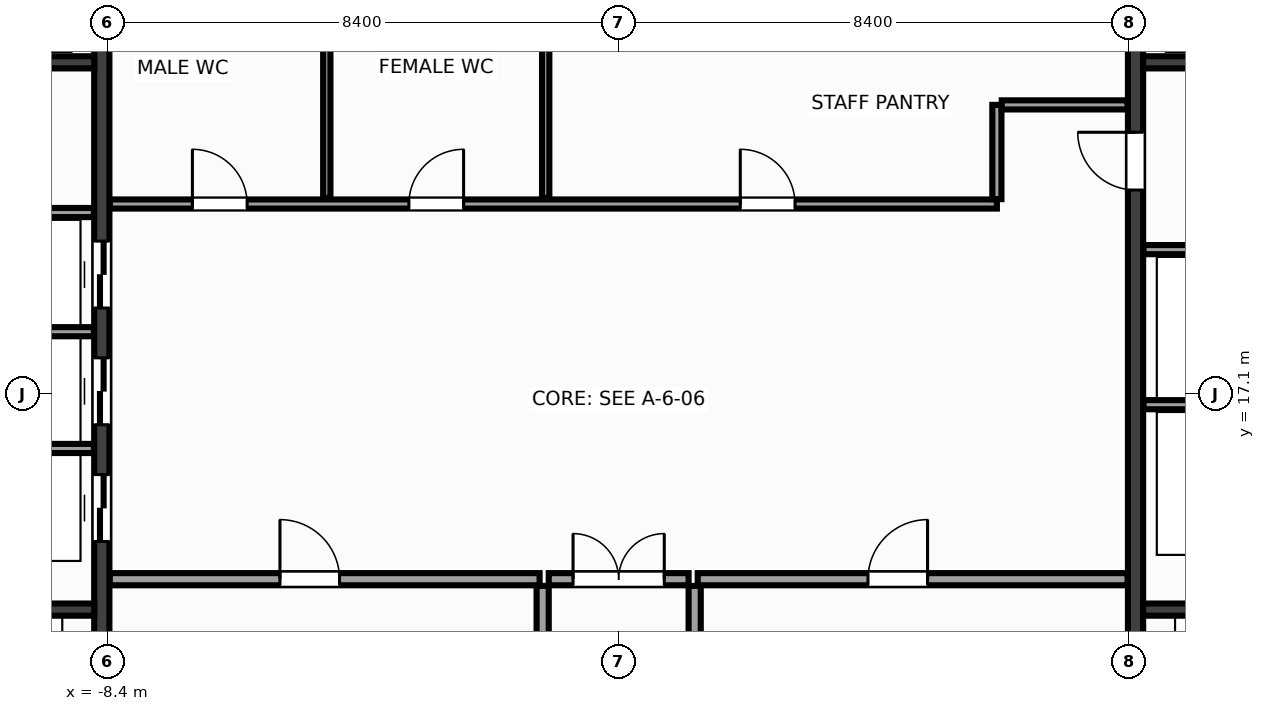
"""IFC4 building model, lengths in metres.
Left out: names, types, materials, properties, quantities, classifications, styles, units other than length and angle.
Written with IfcOpenShell. Run it as: python <this file> out.ifc"""

import sys

from ifc_helpers import new_model, si_unit, direction, frame, frame_2d, origin, place, context, subcontext, project, spatial, rectangle, extrude, source, transform, mapped, element, fill, save


model = new_model("IFC4")
c1 = context("Model", 3, precision=1e-05, world=origin(), true_north=direction((0.0, 1.0)))
c2 = subcontext(c1, "Body", "Model", "MODEL_VIEW")
j1 = project(units=[si_unit("LENGTHUNIT", "METRE"), si_unit("PLANEANGLEUNIT", "RADIAN")], contexts=[c1])
p1 = place(None, origin())
s1 = spatial("IfcSite", under=j1, at=p1, CompositionType="ELEMENT")
p2 = place(p1, origin())
s2 = spatial("IfcBuilding", under=s1, at=p2, CompositionType="ELEMENT")
p3 = place(p2, frame((0.0, 0.0, 196.4)))
s3 = spatial("IfcBuildingStorey", under=s2, at=p3, CompositionType="ELEMENT", Elevation=196.4)
m1 = source(origin(), c2, "Body", "SweptSolid", [
    extrude(rectangle(XDim=13.1, YDim=0.25, at=frame_2d((6.55, 0.0))), origin(), (0.0, 0.0, 1.0), 3.6),
])
p4 = place(p3, frame((-8.5, 10.45, 0.0), z_axis=(0.0, 0.0, 1.0), x_axis=(0.0, 1.0, 0.0)))
e1 = element("IfcWall", 1, at=p4, inside=s3, PredefinedType="SHEAR", context=c2, shape_type="MappedRepresentation", body=[
    mapped(m1, transform((0.0, 0.0, 0.0), x_axis=(1.0, 0.0, 0.0), y_axis=(0.0, 1.0, 0.0), z_axis=(0.0, 0.0, 1.0), scale=1.0)),
])
p5 = place(p4, frame((4.22, 0.0, 0.0)))
e2 = element("IfcOpeningElement", 2, at=p5, cuts=e1, PredefinedType="OPENING", context=c2, shape_type="SweptSolid", body=[
    extrude(rectangle(XDim=1.1, YDim=2.15, at=frame_2d((0.55, 1.075))), frame((0.0, 0.137, 0.0), z_axis=(0.0, -1.0, 0.0), x_axis=(1.0, 0.0, 0.0)), (0.0, 0.0, 1.0), 0.274),
])
p6 = place(p4, frame((6.14, 0.0, 0.0)))
e3 = element("IfcOpeningElement", 3, at=p6, cuts=e1, PredefinedType="OPENING", context=c2, shape_type="SweptSolid", body=[
    extrude(rectangle(XDim=1.1, YDim=2.15, at=frame_2d((0.55, 1.075))), frame((0.0, 0.137, 0.0), z_axis=(0.0, -1.0, 0.0), x_axis=(1.0, 0.0, 0.0)), (0.0, 0.0, 1.0), 0.274),
])
p7 = place(p4, frame((8.06, 0.0, 0.0)))
e4 = element("IfcOpeningElement", 4, at=p7, cuts=e1, PredefinedType="OPENING", context=c2, shape_type="SweptSolid", body=[
    extrude(rectangle(XDim=1.1, YDim=2.15, at=frame_2d((0.55, 1.075))), frame((0.0, 0.137, 0.0), z_axis=(0.0, -1.0, 0.0), x_axis=(1.0, 0.0, 0.0)), (0.0, 0.0, 1.0), 0.274),
])
p8 = place(p3, frame((8.5, 10.45, 0.0), z_axis=(0.0, 0.0, 1.0), x_axis=(0.0, 1.0, 0.0)))
e5 = element("IfcWall", 5, at=p8, inside=s3, PredefinedType="SHEAR", context=c2, shape_type="MappedRepresentation", body=[
    mapped(m1, transform((0.0, 0.0, 0.0), x_axis=(1.0, 0.0, 0.0), y_axis=(0.0, 1.0, 0.0), z_axis=(0.0, 0.0, 1.0), scale=1.0)),
])
p9 = place(p8, frame((10.0, 0.0, 0.0)))
e6 = element("IfcOpeningElement", 6, at=p9, cuts=e5, PredefinedType="OPENING", context=c2, shape_type="SweptSolid", body=[
    extrude(rectangle(XDim=0.95, YDim=2.15, at=frame_2d((0.475, 1.075))), frame((0.0, 0.137, 0.0), z_axis=(0.0, -1.0, 0.0), x_axis=(1.0, 0.0, 0.0)), (0.0, 0.0, 1.0), 0.274),
])
m2 = source(origin(), c2, "Body", "SweptSolid", [
    extrude(rectangle(XDim=2.825, YDim=0.2, at=frame_2d((1.413, 0.0))), origin(), (0.0, 0.0, 1.0), 3.6),
])
for number, where, z_axis, x_axis in (
    (7, (-11.45, 13.55, 0.0), (0.0, 0.0, 1.0), (1.0, 0.0, 0.0)),
    (8, (8.625, 13.55, 0.0), (0.0, 0.0, 1.0), (1.0, 0.0, 0.0)),
):
    element("IfcWall", number, at=place(p3, frame(where, z_axis=z_axis, x_axis=x_axis)), inside=s3, PredefinedType="SHEAR", context=c2, shape_type="MappedRepresentation", body=[
        mapped(m2, transform((0.0, 0.0, 0.0), x_axis=(1.0, 0.0, 0.0), y_axis=(0.0, 1.0, 0.0), z_axis=(0.0, 0.0, 1.0), scale=1.0)),
    ])
m3 = source(origin(), c2, "Body", "SweptSolid", [
    extrude(rectangle(XDim=3.02, YDim=0.2, at=frame_2d((1.51, 0.0))), origin(), (0.0, 0.0, 1.0), 3.6),
])
for number, where, z_axis, x_axis in (
    (9, (-11.645, 22.55, 0.0), (0.0, 0.0, 1.0), (1.0, 0.0, 0.0)),
    (10, (8.625, 22.55, 0.0), (0.0, 0.0, 1.0), (1.0, 0.0, 0.0)),
):
    element("IfcWall", number, at=place(p3, frame(where, z_axis=z_axis, x_axis=x_axis)), inside=s3, PredefinedType="SHEAR", context=c2, shape_type="MappedRepresentation", body=[
        mapped(m3, transform((0.0, 0.0, 0.0), x_axis=(1.0, 0.0, 0.0), y_axis=(0.0, 1.0, 0.0), z_axis=(0.0, 0.0, 1.0), scale=1.0)),
    ])
m4 = source(origin(), c2, "Body", "SweptSolid", [
    extrude(rectangle(XDim=3.01, YDim=0.15, at=frame_2d((1.505, 0.0))), origin(), (0.0, 0.0, 1.0), 3.38),
])
for number, where, z_axis, x_axis in (
    (11, (-11.64, 16.2, 0.0), (0.0, 0.0, 1.0), (1.0, 0.0, 0.0)),
    (12, (-11.64, 18.12, 0.0), (0.0, 0.0, 1.0), (1.0, 0.0, 0.0)),
    (13, (-11.64, 20.08, 0.0), (0.0, 0.0, 1.0), (1.0, 0.0, 0.0)),
    (14, (8.63, 16.92, 0.0), (0.0, 0.0, 1.0), (1.0, 0.0, 0.0)),
    (15, (8.63, 19.47, 0.0), (0.0, 0.0, 1.0), (1.0, 0.0, 0.0)),
):
    element("IfcWall", number, at=place(p3, frame(where, z_axis=z_axis, x_axis=x_axis)), inside=s3, PredefinedType="PARTITIONING", context=c2, shape_type="MappedRepresentation", body=[
        mapped(m4, transform((0.0, 0.0, 0.0), x_axis=(1.0, 0.0, 0.0), y_axis=(0.0, 1.0, 0.0), z_axis=(0.0, 0.0, 1.0), scale=1.0)),
    ])
m5 = source(origin(), c2, "Body", "SweptSolid", [
    extrude(rectangle(XDim=7.07, YDim=0.2, at=frame_2d((3.535, 0.0))), origin(), (0.0, 0.0, 1.0), 3.38),
])
p10 = place(p3, frame((-8.37, 14.05, 0.0), z_axis=(0.0, 0.0, 1.0), x_axis=(1.0, 0.0, 0.0)))
e16 = element("IfcWall", 16, at=p10, inside=s3, PredefinedType="PARTITIONING", context=c2, shape_type="MappedRepresentation", body=[
    mapped(m5, transform((0.0, 0.0, 0.0), x_axis=(1.0, 0.0, 0.0), y_axis=(0.0, 1.0, 0.0), z_axis=(0.0, 0.0, 1.0), scale=1.0)),
])
p11 = place(p10, frame((2.8, 0.0, 0.0)))
e17 = element("IfcOpeningElement", 17, at=p11, cuts=e16, PredefinedType="OPENING", context=c2, shape_type="SweptSolid", body=[
    extrude(rectangle(XDim=0.98, YDim=2.15, at=frame_2d((0.49, 1.075))), frame((0.0, 0.112, 0.0), z_axis=(0.0, -1.0, 0.0), x_axis=(1.0, 0.0, 0.0)), (0.0, 0.0, 1.0), 0.224),
])
p12 = place(p3, frame((1.3, 14.05, 0.0), z_axis=(0.0, 0.0, 1.0), x_axis=(1.0, 0.0, 0.0)))
e18 = element("IfcWall", 18, at=p12, inside=s3, PredefinedType="PARTITIONING", context=c2, shape_type="MappedRepresentation", body=[
    mapped(m5, transform((0.0, 0.0, 0.0), x_axis=(1.0, 0.0, 0.0), y_axis=(0.0, 1.0, 0.0), z_axis=(0.0, 0.0, 1.0), scale=1.0)),
])
p13 = place(p12, frame((2.8, 0.0, 0.0)))
e19 = element("IfcOpeningElement", 19, at=p13, cuts=e18, PredefinedType="OPENING", context=c2, shape_type="SweptSolid", body=[
    extrude(rectangle(XDim=0.98, YDim=2.15, at=frame_2d((0.49, 1.075))), frame((0.0, 0.112, 0.0), z_axis=(0.0, -1.0, 0.0), x_axis=(1.0, 0.0, 0.0)), (0.0, 0.0, 1.0), 0.224),
])
m6 = source(origin(), c2, "Body", "SweptSolid", [
    extrude(rectangle(XDim=3.49, YDim=0.2, at=frame_2d((1.745, 0.0))), origin(), (0.0, 0.0, 1.0), 3.38),
])
for number, where, z_axis, x_axis in (
    (20, (-1.25, 10.45, 0.0), (0.0, 0.0, 1.0), (0.0, 1.0, 0.0)),
    (21, (1.25, 10.45, 0.0), (0.0, 0.0, 1.0), (0.0, 1.0, 0.0)),
):
    element("IfcWall", number, at=place(p3, frame(where, z_axis=z_axis, x_axis=x_axis)), inside=s3, PredefinedType="PARTITIONING", context=c2, shape_type="MappedRepresentation", body=[
        mapped(m6, transform((0.0, 0.0, 0.0), x_axis=(1.0, 0.0, 0.0), y_axis=(0.0, 1.0, 0.0), z_axis=(0.0, 0.0, 1.0), scale=1.0)),
    ])
m7 = source(origin(), c2, "Body", "SweptSolid", [
    extrude(rectangle(XDim=2.3, YDim=0.2, at=frame_2d((1.15, 0.0))), origin(), (0.0, 0.0, 1.0), 3.38),
])
p14 = place(p3, frame((-1.15, 14.05, 0.0), z_axis=(0.0, 0.0, 1.0), x_axis=(1.0, 0.0, 0.0)))
e22 = element("IfcWall", 22, at=p14, inside=s3, PredefinedType="PARTITIONING", context=c2, shape_type="MappedRepresentation", body=[
    mapped(m7, transform((0.0, 0.0, 0.0), x_axis=(1.0, 0.0, 0.0), y_axis=(0.0, 1.0, 0.0), z_axis=(0.0, 0.0, 1.0), scale=1.0)),
])
p15 = place(p14, frame((0.4, 0.0, 0.0)))
e23 = element("IfcOpeningElement", 23, at=p15, cuts=e22, PredefinedType="OPENING", context=c2, shape_type="SweptSolid", body=[
    extrude(rectangle(XDim=1.5, YDim=2.2, at=frame_2d((0.75, 1.1))), frame((0.0, 0.112, 0.0), z_axis=(0.0, -1.0, 0.0), x_axis=(1.0, 0.0, 0.0)), (0.0, 0.0, 1.0), 0.224),
])
m8 = source(origin(), c2, "Body", "SweptSolid", [
    extrude(rectangle(XDim=14.59, YDim=0.15, at=frame_2d((7.295, 0.0))), origin(), (0.0, 0.0, 1.0), 3.38),
])
p16 = place(p3, frame((-8.37, 20.22, 0.0), z_axis=(0.0, 0.0, 1.0), x_axis=(1.0, 0.0, 0.0)))
e24 = element("IfcWall", 24, at=p16, inside=s3, PredefinedType="PARTITIONING", context=c2, shape_type="MappedRepresentation", body=[
    mapped(m8, transform((0.0, 0.0, 0.0), x_axis=(1.0, 0.0, 0.0), y_axis=(0.0, 1.0, 0.0), z_axis=(0.0, 0.0, 1.0), scale=1.0)),
])
p17 = place(p16, frame((1.36, 0.0, 0.0)))
e25 = element("IfcOpeningElement", 25, at=p17, cuts=e24, PredefinedType="OPENING", context=c2, shape_type="SweptSolid", body=[
    extrude(rectangle(XDim=0.9, YDim=2.15, at=frame_2d((0.45, 1.075))), frame((0.0, 0.087, 0.0), z_axis=(0.0, -1.0, 0.0), x_axis=(1.0, 0.0, 0.0)), (0.0, 0.0, 1.0), 0.174),
])
p18 = place(p16, frame((4.92, 0.0, 0.0)))
e26 = element("IfcOpeningElement", 26, at=p18, cuts=e24, PredefinedType="OPENING", context=c2, shape_type="SweptSolid", body=[
    extrude(rectangle(XDim=0.9, YDim=2.15, at=frame_2d((0.45, 1.075))), frame((0.0, 0.087, 0.0), z_axis=(0.0, -1.0, 0.0), x_axis=(1.0, 0.0, 0.0)), (0.0, 0.0, 1.0), 0.174),
])
p19 = place(p16, frame((10.37, 0.0, 0.0)))
e27 = element("IfcOpeningElement", 27, at=p19, cuts=e24, PredefinedType="OPENING", context=c2, shape_type="SweptSolid", body=[
    extrude(rectangle(XDim=0.9, YDim=2.15, at=frame_2d((0.45, 1.075))), frame((0.0, 0.087, 0.0), z_axis=(0.0, -1.0, 0.0), x_axis=(1.0, 0.0, 0.0)), (0.0, 0.0, 1.0), 0.174),
])
m9 = source(origin(), c2, "Body", "SweptSolid", [
    extrude(rectangle(XDim=1.55, YDim=0.15, at=frame_2d((0.775, 0.0))), origin(), (0.0, 0.0, 1.0), 3.38),
])
p20 = place(p3, frame((6.22, 20.3, 0.0), z_axis=(0.0, 0.0, 1.0), x_axis=(0.0, 1.0, 0.0)))
e28 = element("IfcWall", 28, at=p20, inside=s3, PredefinedType="PARTITIONING", context=c2, shape_type="MappedRepresentation", body=[
    mapped(m9, transform((0.0, 0.0, 0.0), x_axis=(1.0, 0.0, 0.0), y_axis=(0.0, 1.0, 0.0), z_axis=(0.0, 0.0, 1.0), scale=1.0)),
])
m10 = source(origin(), c2, "Body", "SweptSolid", [
    extrude(rectangle(XDim=2.07, YDim=0.15, at=frame_2d((1.035, 0.0))), origin(), (0.0, 0.0, 1.0), 3.38),
])
p21 = place(p3, frame((6.3, 21.85, 0.0), z_axis=(0.0, 0.0, 1.0), x_axis=(1.0, 0.0, 0.0)))
e29 = element("IfcWall", 29, at=p21, inside=s3, PredefinedType="PARTITIONING", context=c2, shape_type="MappedRepresentation", body=[
    mapped(m10, transform((0.0, 0.0, 0.0), x_axis=(1.0, 0.0, 0.0), y_axis=(0.0, 1.0, 0.0), z_axis=(0.0, 0.0, 1.0), scale=1.0)),
])
m11 = source(origin(), c2, "Body", "SweptSolid", [
    extrude(rectangle(XDim=3.19, YDim=0.12, at=frame_2d((1.595, 0.0))), origin(), (0.0, 0.0, 1.0), 3.38),
])
for number, where, z_axis, x_axis in (
    (30, (-4.8, 20.32, 0.0), (0.0, 0.0, 1.0), (0.0, 1.0, 0.0)),
    (31, (-1.2, 20.32, 0.0), (0.0, 0.0, 1.0), (0.0, 1.0, 0.0)),
):
    element("IfcWall", number, at=place(p3, frame(where, z_axis=z_axis, x_axis=x_axis)), inside=s3, PredefinedType="PARTITIONING", context=c2, shape_type="MappedRepresentation", body=[
        mapped(m11, transform((0.0, 0.0, 0.0), x_axis=(1.0, 0.0, 0.0), y_axis=(0.0, 1.0, 0.0), z_axis=(0.0, 0.0, 1.0), scale=1.0)),
    ])
m12 = source(origin(), c2, "Body", "SweptSolid", [
    extrude(rectangle(XDim=1.1, YDim=2.15, at=frame_2d((0.55, 1.075))), frame((0.0, 0.025, 0.0), z_axis=(0.0, -1.0, 0.0), x_axis=(1.0, 0.0, 0.0)), (0.0, 0.0, 1.0), 0.05),
])
p22 = place(p5, origin())
e32 = element("IfcDoor", 32, at=p22, inside=s3, OperationType="DOUBLE_DOOR_SLIDING", PredefinedType="DOOR", context=c2, shape_type="MappedRepresentation", body=[
    mapped(m12, transform((0.0, 0.0, 0.0), x_axis=(1.0, 0.0, 0.0), y_axis=(0.0, 1.0, 0.0), z_axis=(0.0, 0.0, 1.0), scale=1.0)),
])
fill(e2, e32)
p23 = place(p6, origin())
e33 = element("IfcDoor", 33, at=p23, inside=s3, OperationType="DOUBLE_DOOR_SLIDING", PredefinedType="DOOR", context=c2, shape_type="MappedRepresentation", body=[
    mapped(m12, transform((0.0, 0.0, 0.0), x_axis=(1.0, 0.0, 0.0), y_axis=(0.0, 1.0, 0.0), z_axis=(0.0, 0.0, 1.0), scale=1.0)),
])
fill(e3, e33)
p24 = place(p7, origin())
e34 = element("IfcDoor", 34, at=p24, inside=s3, OperationType="DOUBLE_DOOR_SLIDING", PredefinedType="DOOR", context=c2, shape_type="MappedRepresentation", body=[
    mapped(m12, transform((0.0, 0.0, 0.0), x_axis=(1.0, 0.0, 0.0), y_axis=(0.0, 1.0, 0.0), z_axis=(0.0, 0.0, 1.0), scale=1.0)),
])
fill(e4, e34)
m13 = source(origin(), c2, "Body", "SweptSolid", [
    extrude(rectangle(XDim=0.95, YDim=2.15, at=frame_2d((0.475, 1.075))), frame((0.0, 0.025, 0.0), z_axis=(0.0, -1.0, 0.0), x_axis=(1.0, 0.0, 0.0)), (0.0, 0.0, 1.0), 0.05),
])
p25 = place(p9, origin())
e35 = element("IfcDoor", 35, at=p25, inside=s3, OperationType="SINGLE_SWING_RIGHT", PredefinedType="DOOR", context=c2, shape_type="MappedRepresentation", body=[
    mapped(m13, transform((0.0, 0.0, 0.0), x_axis=(1.0, 0.0, 0.0), y_axis=(0.0, 1.0, 0.0), z_axis=(0.0, 0.0, 1.0), scale=1.0)),
])
fill(e6, e35)
m14 = source(origin(), c2, "Body", "SweptSolid", [
    extrude(rectangle(XDim=0.98, YDim=2.15, at=frame_2d((0.49, 1.075))), frame((0.0, 0.025, 0.0), z_axis=(0.0, -1.0, 0.0), x_axis=(1.0, 0.0, 0.0)), (0.0, 0.0, 1.0), 0.05),
])
p26 = place(p11, origin())
e36 = element("IfcDoor", 36, at=p26, inside=s3, OperationType="SINGLE_SWING_LEFT", PredefinedType="DOOR", context=c2, shape_type="MappedRepresentation", body=[
    mapped(m14, transform((0.0, 0.0, 0.0), x_axis=(1.0, 0.0, 0.0), y_axis=(0.0, 1.0, 0.0), z_axis=(0.0, 0.0, 1.0), scale=1.0)),
])
fill(e17, e36)
p27 = place(p13, origin())
e37 = element("IfcDoor", 37, at=p27, inside=s3, OperationType="SINGLE_SWING_RIGHT", PredefinedType="DOOR", context=c2, shape_type="MappedRepresentation", body=[
    mapped(m14, transform((0.0, 0.0, 0.0), x_axis=(1.0, 0.0, 0.0), y_axis=(0.0, 1.0, 0.0), z_axis=(0.0, 0.0, 1.0), scale=1.0)),
])
fill(e19, e37)
m15 = source(origin(), c2, "Body", "SweptSolid", [
    extrude(rectangle(XDim=1.5, YDim=2.2, at=frame_2d((0.75, 1.1))), frame((0.0, 0.025, 0.0), z_axis=(0.0, -1.0, 0.0), x_axis=(1.0, 0.0, 0.0)), (0.0, 0.0, 1.0), 0.05),
])
p28 = place(p15, origin())
e38 = element("IfcDoor", 38, at=p28, inside=s3, OperationType="DOUBLE_DOOR_SINGLE_SWING", PredefinedType="DOOR", context=c2, shape_type="MappedRepresentation", body=[
    mapped(m15, transform((0.0, 0.0, 0.0), x_axis=(1.0, 0.0, 0.0), y_axis=(0.0, 1.0, 0.0), z_axis=(0.0, 0.0, 1.0), scale=1.0)),
])
fill(e23, e38)
m16 = source(origin(), c2, "Body", "SweptSolid", [
    extrude(rectangle(XDim=0.9, YDim=2.15, at=frame_2d((0.45, 1.075))), frame((0.0, 0.025, 0.0), z_axis=(0.0, -1.0, 0.0), x_axis=(1.0, 0.0, 0.0)), (0.0, 0.0, 1.0), 0.05),
])
p29 = place(p17, origin())
e39 = element("IfcDoor", 39, at=p29, inside=s3, OperationType="SINGLE_SWING_LEFT", PredefinedType="DOOR", context=c2, shape_type="MappedRepresentation", body=[
    mapped(m16, transform((0.0, 0.0, 0.0), x_axis=(1.0, 0.0, 0.0), y_axis=(0.0, 1.0, 0.0), z_axis=(0.0, 0.0, 1.0), scale=1.0)),
])
fill(e25, e39)
p30 = place(p18, origin())
e40 = element("IfcDoor", 40, at=p30, inside=s3, OperationType="SINGLE_SWING_RIGHT", PredefinedType="DOOR", context=c2, shape_type="MappedRepresentation", body=[
    mapped(m16, transform((0.0, 0.0, 0.0), x_axis=(1.0, 0.0, 0.0), y_axis=(0.0, 1.0, 0.0), z_axis=(0.0, 0.0, 1.0), scale=1.0)),
])
fill(e26, e40)
p31 = place(p19, origin())
e41 = element("IfcDoor", 41, at=p31, inside=s3, OperationType="SINGLE_SWING_LEFT", PredefinedType="DOOR", context=c2, shape_type="MappedRepresentation", body=[
    mapped(m16, transform((0.0, 0.0, 0.0), x_axis=(1.0, 0.0, 0.0), y_axis=(0.0, 1.0, 0.0), z_axis=(0.0, 0.0, 1.0), scale=1.0)),
])
fill(e27, e41)
save(model, sys.argv[1])
